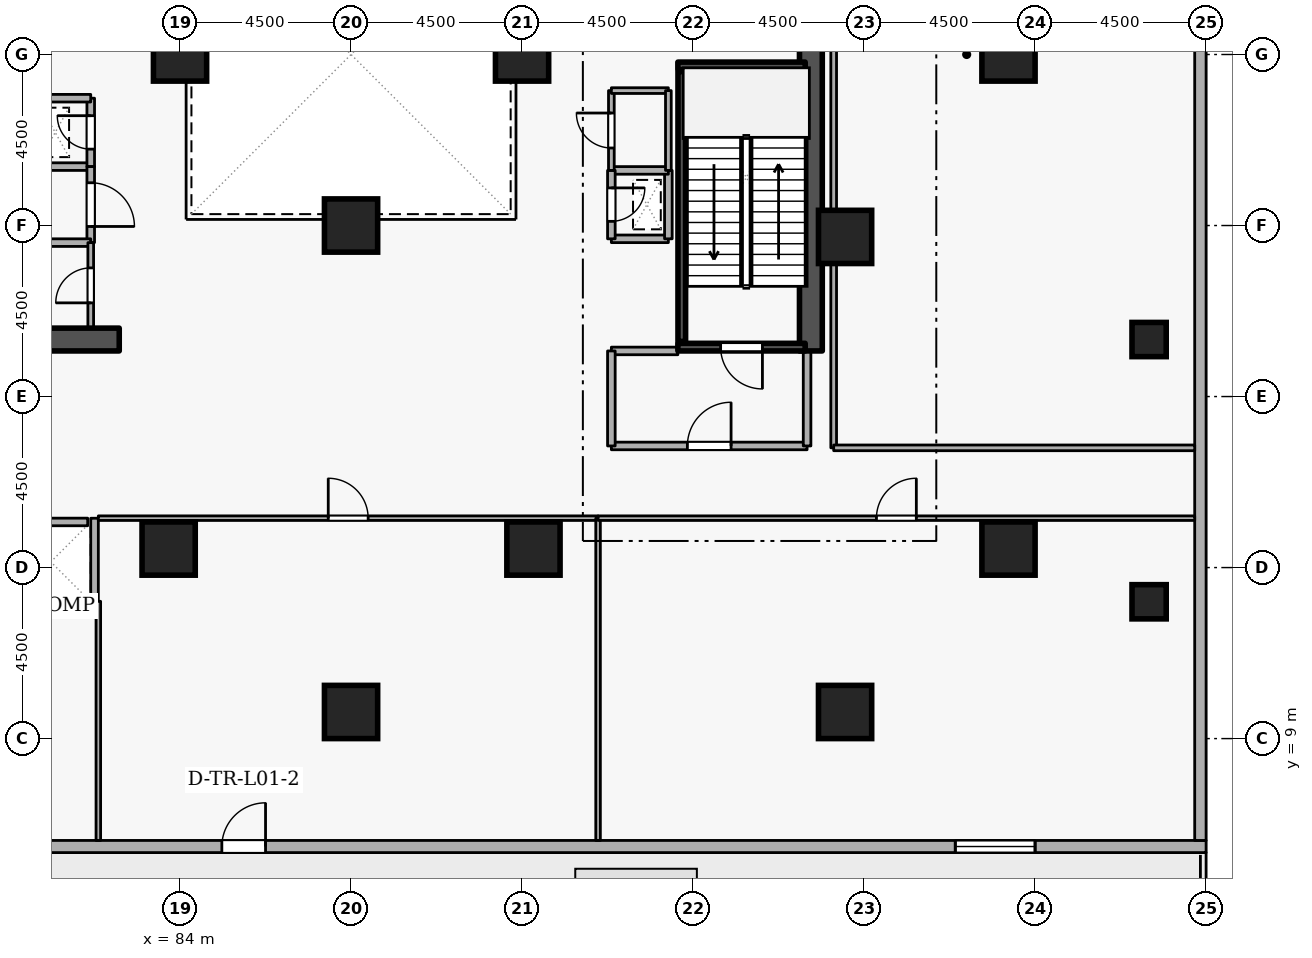
"""IFC4 building model, lengths in metres.
Left out: names, types, materials, properties, quantities, classifications, styles, units other than length and angle.
Written with IfcOpenShell. Run it as: python <this file> out.ifc"""

import sys

from ifc_helpers import new_model, si_unit, direction, frame, frame_2d, origin, origin_2d, place, context, subcontext, project, spatial, rectangle, extrude, element, fill, save


model = new_model("IFC4")
c1 = context("Model", 3, precision=1e-05, world=origin(), true_north=direction((0.0, 1.0)))
c2 = subcontext(c1, "Body", "Model", "MODEL_VIEW")
j1 = project(units=[si_unit("LENGTHUNIT", "METRE"), si_unit("PLANEANGLEUNIT", "RADIAN")], contexts=[c1])
p1 = place(None, origin())
s1 = spatial("IfcSite", under=j1, at=p1, CompositionType="ELEMENT")
p2 = place(p1, origin())
s2 = spatial("IfcBuilding", under=s1, at=p2, CompositionType="ELEMENT")
p3 = place(p2, frame((0.0, 0.0, 4.8)))
s3 = spatial("IfcBuildingStorey", under=s2, at=p3, CompositionType="ELEMENT", Elevation=4.8)
p4 = place(p3, frame((100.6, 19.2, 0.0), z_axis=(0.0, 0.0, 1.0), x_axis=(0.0, 1.0, 0.0)))
e1 = element("IfcWall", 1, at=p4, inside=s3, PredefinedType="SHEAR", context=c2, shape_type="SweptSolid", body=[
    extrude(rectangle(XDim=15.6, YDim=0.6, at=frame_2d((7.8, 0.0))), origin(), (0.0, 0.0, 1.0), 4.8),
])
p5 = place(p3, frame((76.7, 19.5, 0.0), z_axis=(0.0, 0.0, 1.0), x_axis=(1.0, 0.0, 0.0)))
e2 = element("IfcWall", 2, at=p5, inside=s3, PredefinedType="SHEAR", context=c2, shape_type="SweptSolid", body=[
    extrude(rectangle(XDim=5.7, YDim=0.6, at=frame_2d((2.85, 0.0))), origin(), (0.0, 0.0, 1.0), 4.8),
])
for number, where, z_axis, x_axis in (
    (3, (105.8, 14.0, 0.0), (0.0, 0.0, 1.0), (1.0, 0.0, 0.0)),
    (4, (105.8, 27.0, 0.0), (0.0, 0.0, 1.0), (1.0, 0.0, 0.0)),
    (5, (101.5, 9.7, 0.0), (0.0, 0.0, 1.0), (1.0, 0.0, 0.0)),
    (6, (88.5, 9.7, 0.0), (0.0, 0.0, 1.0), (1.0, 0.0, 0.0)),
    (7, (93.3, 14.0, 0.0), (0.0, 0.0, 1.0), (1.0, 0.0, 0.0)),
    (8, (83.7, 14.0, 0.0), (0.0, 0.0, 1.0), (1.0, 0.0, 0.0)),
    (9, (101.5, 22.2, 0.0), (0.0, 0.0, 1.0), (1.0, 0.0, 0.0)),
    (10, (93.0, 27.0, 0.0), (0.0, 0.0, 1.0), (1.0, 0.0, 0.0)),
    (11, (84.0, 27.0, 0.0), (0.0, 0.0, 1.0), (1.0, 0.0, 0.0)),
    (12, (88.5, 22.5, 0.0), (0.0, 0.0, 1.0), (1.0, 0.0, 0.0)),
):
    element("IfcColumn", number, at=place(p3, frame(where, z_axis=z_axis, x_axis=x_axis)), inside=s3, PredefinedType="COLUMN", context=c2, shape_type="SweptSolid", body=[
        extrude(rectangle(XDim=1.4, YDim=1.4, at=origin_2d()), origin(), (0.0, 0.0, 1.0), 4.8),
    ])
for number, where, z_axis, x_axis in (
    (13, (109.5, 12.6, 0.0), (0.0, 0.0, 1.0), (1.0, 0.0, 0.0)),
    (14, (109.5, 19.5, 0.0), (0.0, 0.0, 1.0), (1.0, 0.0, 0.0)),
):
    element("IfcColumn", number, at=place(p3, frame(where, z_axis=z_axis, x_axis=x_axis)), inside=s3, PredefinedType="COLUMN", context=c2, shape_type="SweptSolid", body=[
        extrude(rectangle(XDim=0.9, YDim=0.9, at=origin_2d()), origin(), (0.0, 0.0, 1.0), 4.8),
    ])
p6 = place(p3, frame((71.6, 6.16, 0.0), z_axis=(0.0, 0.0, 1.0), x_axis=(1.0, 0.0, 0.0)))
e15 = element("IfcWall", 15, at=p6, inside=s3, PredefinedType="STANDARD", context=c2, shape_type="SweptSolid", body=[
    extrude(rectangle(XDim=39.4, YDim=0.32, at=frame_2d((19.7, 0.0))), origin(), (0.0, 0.0, 1.0), 3.86),
])
p7 = place(p6, frame((13.5, 0.0, 0.0)))
e16 = element("IfcOpeningElement", 16, at=p7, cuts=e15, PredefinedType="OPENING", context=c2, shape_type="SweptSolid", body=[
    extrude(rectangle(XDim=1.15, YDim=2.1, at=frame_2d((0.575, 1.05))), frame((0.0, 0.17, 0.0), z_axis=(0.0, -1.0, 0.0), x_axis=(1.0, 0.0, 0.0)), (0.0, 0.0, 1.0), 0.34),
])
p8 = place(p6, frame((3.0, 0.0, 0.78)))
e17 = element("IfcOpeningElement", 17, at=p8, cuts=e15, PredefinedType="OPENING", context=c2, shape_type="SweptSolid", body=[
    extrude(rectangle(XDim=2.1, YDim=2.4, at=frame_2d((1.05, 1.2))), frame((0.0, 0.17, 0.0), z_axis=(0.0, -1.0, 0.0), x_axis=(1.0, 0.0, 0.0)), (0.0, 0.0, 1.0), 0.34),
])
p9 = place(p6, frame((32.8, 0.0, 0.78)))
e18 = element("IfcOpeningElement", 18, at=p9, cuts=e15, PredefinedType="OPENING", context=c2, shape_type="SweptSolid", body=[
    extrude(rectangle(XDim=2.1, YDim=2.4, at=frame_2d((1.05, 1.2))), frame((0.0, 0.17, 0.0), z_axis=(0.0, -1.0, 0.0), x_axis=(1.0, 0.0, 0.0)), (0.0, 0.0, 1.0), 0.34),
])
p10 = place(p3, frame((110.85, 6.32, 0.0), z_axis=(0.0, 0.0, 1.0), x_axis=(0.0, 1.0, 0.0)))
e19 = element("IfcWall", 19, at=p10, inside=s3, PredefinedType="STANDARD", context=c2, shape_type="SweptSolid", body=[
    extrude(rectangle(XDim=42.86, YDim=0.3, at=frame_2d((21.43, 0.0))), origin(), (0.0, 0.0, 1.0), 3.86),
])
p11 = place(p3, frame((79.63, 14.7, 0.0), z_axis=(0.0, 0.0, 1.0), x_axis=(1.0, 0.0, 0.0)))
e20 = element("IfcWall", 20, at=p11, inside=s3, PredefinedType="STANDARD", context=c2, shape_type="SweptSolid", body=[
    extrude(rectangle(XDim=1.94, YDim=0.2, at=frame_2d((0.97, 0.0))), origin(), (0.0, 0.0, 1.0), 4.46),
])
p12 = place(p3, frame((79.452, 12.5, 0.0), z_axis=(0.0, 0.0, 1.0), x_axis=(1.0, 0.0, 0.0)))
e21 = element("IfcWall", 21, at=p12, inside=s3, PredefinedType="STANDARD", context=c2, shape_type="SweptSolid", body=[
    extrude(rectangle(XDim=2.296, YDim=0.2, at=frame_2d((1.148, 0.0))), origin(), (0.0, 0.0, 1.0), 4.46),
])
p13 = place(p3, frame((81.75, 12.612, 0.0), z_axis=(0.0, 0.0, 1.0), x_axis=(0.0, 1.0, 0.0)))
e22 = element("IfcWall", 22, at=p13, inside=s3, PredefinedType="STANDARD", context=c2, shape_type="SweptSolid", body=[
    extrude(rectangle(XDim=2.186, YDim=0.2, at=frame_2d((1.093, 0.0))), origin(), (0.0, 0.0, 1.0), 4.46),
])
p14 = place(p3, frame((100.45, 19.3, 0.0), z_axis=(0.0, 0.0, 1.0), x_axis=(-1.0, 0.0, 0.0)))
e23 = element("IfcWall", 23, at=p14, inside=s3, PredefinedType="SHEAR", context=c2, shape_type="SweptSolid", body=[
    extrude(rectangle(XDim=3.35, YDim=0.2, at=frame_2d((1.675, 0.0))), origin(), (0.0, 0.0, 1.0), 4.8),
])
p15 = place(p14, frame((1.125, 0.0, 0.0)))
e24 = element("IfcOpeningElement", 24, at=p15, cuts=e23, PredefinedType="OPENING", context=c2, shape_type="SweptSolid", body=[
    extrude(rectangle(XDim=1.1, YDim=2.1, at=frame_2d((0.55, 1.05))), frame((0.0, 0.11, 0.0), z_axis=(0.0, -1.0, 0.0), x_axis=(1.0, 0.0, 0.0)), (0.0, 0.0, 1.0), 0.22),
])
p16 = place(p3, frame((97.1, 26.7, 0.0), z_axis=(0.0, 0.0, 1.0), x_axis=(1.0, 0.0, 0.0)))
e25 = element("IfcWall", 25, at=p16, inside=s3, PredefinedType="SHEAR", context=c2, shape_type="SweptSolid", body=[
    extrude(rectangle(XDim=3.35, YDim=0.2, at=frame_2d((1.675, 0.0))), origin(), (0.0, 0.0, 1.0), 4.8),
])
p17 = place(p3, frame((97.203, 26.55, 0.0), z_axis=(0.0, 0.0, 1.0), x_axis=(0.0, -1.0, 0.0)))
e26 = element("IfcWall", 26, at=p17, inside=s3, PredefinedType="SHEAR", context=c2, shape_type="SweptSolid", body=[
    extrude(rectangle(XDim=7.1, YDim=0.2, at=frame_2d((3.55, 0.0))), origin(), (0.0, 0.0, 1.0), 4.8),
])
p18 = place(p3, frame((95.35, 16.7, 0.0), z_axis=(0.0, 0.0, 1.0), x_axis=(1.0, 0.0, 0.0)))
e27 = element("IfcWall", 27, at=p18, inside=s3, PredefinedType="STANDARD", context=c2, shape_type="SweptSolid", body=[
    extrude(rectangle(XDim=5.15, YDim=0.2, at=frame_2d((2.575, 0.0))), origin(), (0.0, 0.0, 1.0), 4.46),
])
p19 = place(p18, frame((2.0, 0.0, 0.0)))
e28 = element("IfcOpeningElement", 28, at=p19, cuts=e27, PredefinedType="OPENING", context=c2, shape_type="SweptSolid", body=[
    extrude(rectangle(XDim=1.15, YDim=2.1, at=frame_2d((0.575, 1.05))), frame((0.0, 0.11, 0.0), z_axis=(0.0, -1.0, 0.0), x_axis=(1.0, 0.0, 0.0)), (0.0, 0.0, 1.0), 0.22),
])
p20 = place(p3, frame((100.5, 16.7, 0.0), z_axis=(0.0, 0.0, 1.0), x_axis=(0.0, 1.0, 0.0)))
e29 = element("IfcWall", 29, at=p20, inside=s3, PredefinedType="STANDARD", context=c2, shape_type="SweptSolid", body=[
    extrude(rectangle(XDim=2.5, YDim=0.2, at=frame_2d((1.25, 0.0))), origin(), (0.0, 0.0, 1.0), 4.46),
])
p21 = place(p3, frame((97.1, 19.2, 0.0), z_axis=(0.0, 0.0, 1.0), x_axis=(-1.0, 0.0, 0.0)))
e30 = element("IfcWall", 30, at=p21, inside=s3, PredefinedType="STANDARD", context=c2, shape_type="SweptSolid", body=[
    extrude(rectangle(XDim=1.75, YDim=0.2, at=frame_2d((0.875, 0.0))), origin(), (0.0, 0.0, 1.0), 3.665),
])
p22 = place(p3, frame((95.35, 19.2, 0.0), z_axis=(0.0, 0.0, 1.0), x_axis=(0.0, -1.0, 0.0)))
e31 = element("IfcWall", 31, at=p22, inside=s3, PredefinedType="STANDARD", context=c2, shape_type="SweptSolid", body=[
    extrude(rectangle(XDim=2.5, YDim=0.2, at=frame_2d((1.25, 0.0))), origin(), (0.0, 0.0, 1.0), 4.46),
])
p23 = place(p3, frame((95.35, 22.15, 0.0), z_axis=(0.0, 0.0, 1.0), x_axis=(1.0, 0.0, 0.0)))
e32 = element("IfcWall", 32, at=p23, inside=s3, PredefinedType="STANDARD", context=c2, shape_type="SweptSolid", body=[
    extrude(rectangle(XDim=1.5, YDim=0.2, at=frame_2d((0.75, 0.0))), origin(), (0.0, 0.0, 1.0), 4.46),
])
p24 = place(p3, frame((96.85, 22.15, 0.0), z_axis=(0.0, 0.0, 1.0), x_axis=(0.0, 1.0, 0.0)))
e33 = element("IfcWall", 33, at=p24, inside=s3, PredefinedType="STANDARD", context=c2, shape_type="SweptSolid", body=[
    extrude(rectangle(XDim=1.8, YDim=0.2, at=frame_2d((0.9, 0.0))), origin(), (0.0, 0.0, 1.0), 4.46),
])
p25 = place(p3, frame((96.85, 23.95, 0.0), z_axis=(0.0, 0.0, 1.0), x_axis=(-1.0, 0.0, 0.0)))
e34 = element("IfcWall", 34, at=p25, inside=s3, PredefinedType="STANDARD", context=c2, shape_type="SweptSolid", body=[
    extrude(rectangle(XDim=1.5, YDim=0.2, at=frame_2d((0.75, 0.0))), origin(), (0.0, 0.0, 1.0), 4.46),
])
p26 = place(p3, frame((95.35, 23.95, 0.0), z_axis=(0.0, 0.0, 1.0), x_axis=(0.0, -1.0, 0.0)))
e35 = element("IfcWall", 35, at=p26, inside=s3, PredefinedType="STANDARD", context=c2, shape_type="SweptSolid", body=[
    extrude(rectangle(XDim=1.8, YDim=0.2, at=frame_2d((0.9, 0.0))), origin(), (0.0, 0.0, 1.0), 4.46),
])
p27 = place(p26, frame((0.46, 0.0, 0.0)))
e36 = element("IfcOpeningElement", 36, at=p27, cuts=e35, PredefinedType="OPENING", context=c2, shape_type="SweptSolid", body=[
    extrude(rectangle(XDim=0.88, YDim=2.04, at=frame_2d((0.44, 1.02))), frame((0.0, 0.11, 0.0), z_axis=(0.0, -1.0, 0.0), x_axis=(1.0, 0.0, 0.0)), (0.0, 0.0, 1.0), 0.22),
])
p28 = place(p3, frame((80.15, 24.05, 0.0), z_axis=(0.0, 0.0, 1.0), x_axis=(1.0, 0.0, 0.0)))
e37 = element("IfcWall", 37, at=p28, inside=s3, PredefinedType="STANDARD", context=c2, shape_type="SweptSolid", body=[
    extrude(rectangle(XDim=1.5, YDim=0.2, at=frame_2d((0.75, 0.0))), origin(), (0.0, 0.0, 1.0), 4.46),
])
p29 = place(p3, frame((81.65, 24.05, 0.0), z_axis=(0.0, 0.0, 1.0), x_axis=(0.0, 1.0, 0.0)))
e38 = element("IfcWall", 38, at=p29, inside=s3, PredefinedType="STANDARD", context=c2, shape_type="SweptSolid", body=[
    extrude(rectangle(XDim=1.8, YDim=0.2, at=frame_2d((0.9, 0.0))), origin(), (0.0, 0.0, 1.0), 4.46),
])
p30 = place(p29, frame((0.46, 0.0, 0.0)))
e39 = element("IfcOpeningElement", 39, at=p30, cuts=e38, PredefinedType="OPENING", context=c2, shape_type="SweptSolid", body=[
    extrude(rectangle(XDim=0.88, YDim=2.04, at=frame_2d((0.44, 1.02))), frame((0.0, 0.11, 0.0), z_axis=(0.0, -1.0, 0.0), x_axis=(1.0, 0.0, 0.0)), (0.0, 0.0, 1.0), 0.22),
])
p31 = place(p3, frame((81.65, 25.85, 0.0), z_axis=(0.0, 0.0, 1.0), x_axis=(-1.0, 0.0, 0.0)))
e40 = element("IfcWall", 40, at=p31, inside=s3, PredefinedType="STANDARD", context=c2, shape_type="SweptSolid", body=[
    extrude(rectangle(XDim=1.5, YDim=0.2, at=frame_2d((0.75, 0.0))), origin(), (0.0, 0.0, 1.0), 4.46),
])
p32 = place(p3, frame((81.65, 24.05, 0.0), z_axis=(0.0, 0.0, 1.0), x_axis=(0.0, -1.0, 0.0)))
e41 = element("IfcWall", 41, at=p32, inside=s3, PredefinedType="STANDARD", context=c2, shape_type="SweptSolid", body=[
    extrude(rectangle(XDim=2.0, YDim=0.2, at=frame_2d((1.0, 0.0))), origin(), (0.0, 0.0, 1.0), 4.46),
])
p33 = place(p32, frame((0.425, 0.0, 0.0)))
e42 = element("IfcOpeningElement", 42, at=p33, cuts=e41, PredefinedType="OPENING", context=c2, shape_type="SweptSolid", body=[
    extrude(rectangle(XDim=1.15, YDim=2.1, at=frame_2d((0.575, 1.05))), frame((0.0, 0.11, 0.0), z_axis=(0.0, -1.0, 0.0), x_axis=(1.0, 0.0, 0.0)), (0.0, 0.0, 1.0), 0.22),
])
p34 = place(p3, frame((81.65, 22.05, 0.0), z_axis=(0.0, 0.0, 1.0), x_axis=(-1.0, 0.0, 0.0)))
e43 = element("IfcWall", 43, at=p34, inside=s3, PredefinedType="STANDARD", context=c2, shape_type="SweptSolid", body=[
    extrude(rectangle(XDim=1.5, YDim=0.2, at=frame_2d((0.75, 0.0))), origin(), (0.0, 0.0, 1.0), 4.46),
])
p35 = place(p3, frame((95.35, 23.95, 0.0), z_axis=(0.0, 0.0, 1.0), x_axis=(0.0, 1.0, 0.0)))
e44 = element("IfcWall", 44, at=p35, inside=s3, PredefinedType="PARTITIONING", context=c2, shape_type="SweptSolid", body=[
    extrude(rectangle(XDim=2.1, YDim=0.15, at=frame_2d((1.05, 0.0))), origin(), (0.0, 0.0, 1.0), 4.46),
])
p36 = place(p35, frame((0.59, 0.0, 0.0)))
e45 = element("IfcOpeningElement", 45, at=p36, cuts=e44, PredefinedType="OPENING", context=c2, shape_type="SweptSolid", body=[
    extrude(rectangle(XDim=0.92, YDim=2.08, at=frame_2d((0.46, 1.04))), frame((0.0, 0.085, 0.0), z_axis=(0.0, -1.0, 0.0), x_axis=(1.0, 0.0, 0.0)), (0.0, 0.0, 1.0), 0.17),
])
p37 = place(p3, frame((95.35, 26.05, 0.0), z_axis=(0.0, 0.0, 1.0), x_axis=(1.0, 0.0, 0.0)))
e46 = element("IfcWall", 46, at=p37, inside=s3, PredefinedType="PARTITIONING", context=c2, shape_type="SweptSolid", body=[
    extrude(rectangle(XDim=1.5, YDim=0.15, at=frame_2d((0.75, 0.0))), origin(), (0.0, 0.0, 1.0), 4.46),
])
p38 = place(p3, frame((96.85, 26.05, 0.0), z_axis=(0.0, 0.0, 1.0), x_axis=(0.0, -1.0, 0.0)))
e47 = element("IfcWall", 47, at=p38, inside=s3, PredefinedType="PARTITIONING", context=c2, shape_type="SweptSolid", body=[
    extrude(rectangle(XDim=2.1, YDim=0.15, at=frame_2d((1.05, 0.0))), origin(), (0.0, 0.0, 1.0), 4.46),
])
p39 = place(p3, frame((81.65, 19.8, 0.0), z_axis=(0.0, 0.0, 1.0), x_axis=(0.0, 1.0, 0.0)))
e48 = element("IfcWall", 48, at=p39, inside=s3, PredefinedType="PARTITIONING", context=c2, shape_type="SweptSolid", body=[
    extrude(rectangle(XDim=2.25, YDim=0.15, at=frame_2d((1.125, 0.0))), origin(), (0.0, 0.0, 1.0), 4.46),
])
p40 = place(p39, frame((0.665, 0.0, 0.0)))
e49 = element("IfcOpeningElement", 49, at=p40, cuts=e48, PredefinedType="OPENING", context=c2, shape_type="SweptSolid", body=[
    extrude(rectangle(XDim=0.92, YDim=2.08, at=frame_2d((0.46, 1.04))), frame((0.0, 0.085, 0.0), z_axis=(0.0, -1.0, 0.0), x_axis=(1.0, 0.0, 0.0)), (0.0, 0.0, 1.0), 0.17),
])
p41 = place(p3, frame((81.85, 6.32, 0.0), z_axis=(0.0, 0.0, 1.0), x_axis=(0.0, 1.0, 0.0)))
e50 = element("IfcWall", 50, at=p41, inside=s3, PredefinedType="PARTITIONING", context=c2, shape_type="SweptSolid", body=[
    extrude(rectangle(XDim=6.292, YDim=0.12, at=frame_2d((3.146, 0.0))), origin(), (0.0, 0.0, 1.0), 4.46),
])
p42 = place(p3, frame((81.85, 14.8, 0.0), z_axis=(0.0, 0.0, 1.0), x_axis=(1.0, 0.0, 0.0)))
e51 = element("IfcWall", 51, at=p42, inside=s3, PredefinedType="PARTITIONING", context=c2, shape_type="SweptSolid", body=[
    extrude(rectangle(XDim=13.15, YDim=0.12, at=frame_2d((6.575, 0.0))), origin(), (0.0, 0.0, 1.0), 4.46),
])
p43 = place(p42, frame((6.05, 0.0, 0.0)))
e52 = element("IfcOpeningElement", 52, at=p43, cuts=e51, PredefinedType="OPENING", context=c2, shape_type="SweptSolid", body=[
    extrude(rectangle(XDim=1.05, YDim=2.1, at=frame_2d((0.525, 1.05))), frame((0.0, 0.07, 0.0), z_axis=(0.0, -1.0, 0.0), x_axis=(1.0, 0.0, 0.0)), (0.0, 0.0, 1.0), 0.14),
])
p44 = place(p3, frame((95.0, 14.8, 0.0), z_axis=(0.0, 0.0, 1.0), x_axis=(0.0, -1.0, 0.0)))
e53 = element("IfcWall", 53, at=p44, inside=s3, PredefinedType="PARTITIONING", context=c2, shape_type="SweptSolid", body=[
    extrude(rectangle(XDim=8.48, YDim=0.12, at=frame_2d((4.24, 0.0))), origin(), (0.0, 0.0, 1.0), 4.46),
])
p45 = place(p3, frame((95.0, 14.8, 0.0), z_axis=(0.0, 0.0, 1.0), x_axis=(1.0, 0.0, 0.0)))
e54 = element("IfcWall", 54, at=p45, inside=s3, PredefinedType="PARTITIONING", context=c2, shape_type="SweptSolid", body=[
    extrude(rectangle(XDim=15.7, YDim=0.12, at=frame_2d((7.85, 0.0))), origin(), (0.0, 0.0, 1.0), 4.46),
])
p46 = place(p45, frame((7.325, 0.0, 0.0)))
e55 = element("IfcOpeningElement", 55, at=p46, cuts=e54, PredefinedType="OPENING", context=c2, shape_type="SweptSolid", body=[
    extrude(rectangle(XDim=1.05, YDim=2.1, at=frame_2d((0.525, 1.05))), frame((0.0, 0.07, 0.0), z_axis=(0.0, -1.0, 0.0), x_axis=(1.0, 0.0, 0.0)), (0.0, 0.0, 1.0), 0.14),
])
p47 = place(p3, frame((101.2, 16.65, 0.0), z_axis=(0.0, 0.0, 1.0), x_axis=(0.0, 1.0, 0.0)))
e56 = element("IfcWall", 56, at=p47, inside=s3, PredefinedType="PARTITIONING", context=c2, shape_type="SweptSolid", body=[
    extrude(rectangle(XDim=24.15, YDim=0.15, at=frame_2d((12.075, 0.0))), origin(), (0.0, 0.0, 1.0), 4.46),
])
p48 = place(p3, frame((110.7, 16.65, 0.0), z_axis=(0.0, 0.0, 1.0), x_axis=(-1.0, 0.0, 0.0)))
e57 = element("IfcWall", 57, at=p48, inside=s3, PredefinedType="PARTITIONING", context=c2, shape_type="SweptSolid", body=[
    extrude(rectangle(XDim=9.5, YDim=0.15, at=frame_2d((4.75, 0.0))), origin(), (0.0, 0.0, 1.0), 4.46),
])
p49 = place(p7, origin())
e58 = element("IfcDoor", 58, at=p49, inside=s3, OperationType="SINGLE_SWING_RIGHT", PredefinedType="DOOR", context=c2, shape_type="SweptSolid", body=[
    extrude(rectangle(XDim=1.15, YDim=2.1, at=frame_2d((0.575, 1.05))), frame((0.0, 0.025, 0.0), z_axis=(0.0, -1.0, 0.0), x_axis=(1.0, 0.0, 0.0)), (0.0, 0.0, 1.0), 0.05),
])
fill(e16, e58)
p50 = place(p9, origin())
e59 = element("IfcWindow", 59, at=p50, inside=s3, PartitioningType="SINGLE_PANEL", PredefinedType="WINDOW", context=c2, shape_type="SweptSolid", body=[
    extrude(rectangle(XDim=2.1, YDim=2.4, at=frame_2d((1.05, 1.2))), frame((0.0, 0.03, 0.0), z_axis=(0.0, -1.0, 0.0), x_axis=(1.0, 0.0, 0.0)), (0.0, 0.0, 1.0), 0.06),
])
fill(e18, e59)
p51 = place(p15, origin())
e60 = element("IfcDoor", 60, at=p51, inside=s3, OperationType="SINGLE_SWING_LEFT", PredefinedType="DOOR", context=c2, shape_type="SweptSolid", body=[
    extrude(rectangle(XDim=1.1, YDim=2.1, at=frame_2d((0.55, 1.05))), frame((0.0, 0.025, 0.0), z_axis=(0.0, -1.0, 0.0), x_axis=(1.0, 0.0, 0.0)), (0.0, 0.0, 1.0), 0.05),
])
fill(e24, e60)
p52 = place(p19, origin())
e61 = element("IfcDoor", 61, at=p52, inside=s3, OperationType="SINGLE_SWING_RIGHT", PredefinedType="DOOR", context=c2, shape_type="SweptSolid", body=[
    extrude(rectangle(XDim=1.15, YDim=2.1, at=frame_2d((0.575, 1.05))), frame((0.0, 0.025, 0.0), z_axis=(0.0, -1.0, 0.0), x_axis=(1.0, 0.0, 0.0)), (0.0, 0.0, 1.0), 0.05),
])
fill(e28, e61)
p53 = place(p27, origin())
e62 = element("IfcDoor", 62, at=p53, inside=s3, OperationType="SINGLE_SWING_LEFT", PredefinedType="DOOR", context=c2, shape_type="SweptSolid", body=[
    extrude(rectangle(XDim=0.88, YDim=2.04, at=frame_2d((0.44, 1.02))), frame((0.0, 0.025, 0.0), z_axis=(0.0, -1.0, 0.0), x_axis=(1.0, 0.0, 0.0)), (0.0, 0.0, 1.0), 0.05),
])
fill(e36, e62)
p54 = place(p30, origin())
e63 = element("IfcDoor", 63, at=p54, inside=s3, OperationType="SINGLE_SWING_RIGHT", PredefinedType="DOOR", context=c2, shape_type="SweptSolid", body=[
    extrude(rectangle(XDim=0.88, YDim=2.04, at=frame_2d((0.44, 1.02))), frame((0.0, 0.025, 0.0), z_axis=(0.0, -1.0, 0.0), x_axis=(1.0, 0.0, 0.0)), (0.0, 0.0, 1.0), 0.05),
])
fill(e39, e63)
p55 = place(p36, origin())
e64 = element("IfcDoor", 64, at=p55, inside=s3, OperationType="SINGLE_SWING_RIGHT", PredefinedType="DOOR", context=c2, shape_type="SweptSolid", body=[
    extrude(rectangle(XDim=0.92, YDim=2.08, at=frame_2d((0.46, 1.04))), frame((0.0, 0.025, 0.0), z_axis=(0.0, -1.0, 0.0), x_axis=(1.0, 0.0, 0.0)), (0.0, 0.0, 1.0), 0.05),
])
fill(e45, e64)
p56 = place(p40, origin())
e65 = element("IfcDoor", 65, at=p56, inside=s3, OperationType="SINGLE_SWING_LEFT", PredefinedType="DOOR", context=c2, shape_type="SweptSolid", body=[
    extrude(rectangle(XDim=0.92, YDim=2.08, at=frame_2d((0.46, 1.04))), frame((0.0, 0.025, 0.0), z_axis=(0.0, -1.0, 0.0), x_axis=(1.0, 0.0, 0.0)), (0.0, 0.0, 1.0), 0.05),
])
fill(e49, e65)
p57 = place(p33, origin())
e66 = element("IfcDoor", 66, at=p57, inside=s3, OperationType="SINGLE_SWING_RIGHT", PredefinedType="DOOR", context=c2, shape_type="SweptSolid", body=[
    extrude(rectangle(XDim=1.15, YDim=2.1, at=frame_2d((0.575, 1.05))), frame((0.0, 0.025, 0.0), z_axis=(0.0, -1.0, 0.0), x_axis=(1.0, 0.0, 0.0)), (0.0, 0.0, 1.0), 0.05),
])
fill(e42, e66)
p58 = place(p43, origin())
e67 = element("IfcDoor", 67, at=p58, inside=s3, OperationType="SINGLE_SWING_LEFT", PredefinedType="DOOR", context=c2, shape_type="SweptSolid", body=[
    extrude(rectangle(XDim=1.05, YDim=2.1, at=frame_2d((0.525, 1.05))), frame((0.0, 0.025, 0.0), z_axis=(0.0, -1.0, 0.0), x_axis=(1.0, 0.0, 0.0)), (0.0, 0.0, 1.0), 0.05),
])
fill(e52, e67)
p59 = place(p46, origin())
e68 = element("IfcDoor", 68, at=p59, inside=s3, OperationType="SINGLE_SWING_RIGHT", PredefinedType="DOOR", context=c2, shape_type="SweptSolid", body=[
    extrude(rectangle(XDim=1.05, YDim=2.1, at=frame_2d((0.525, 1.05))), frame((0.0, 0.025, 0.0), z_axis=(0.0, -1.0, 0.0), x_axis=(1.0, 0.0, 0.0)), (0.0, 0.0, 1.0), 0.05),
])
fill(e55, e68)
save(model, sys.argv[1])
